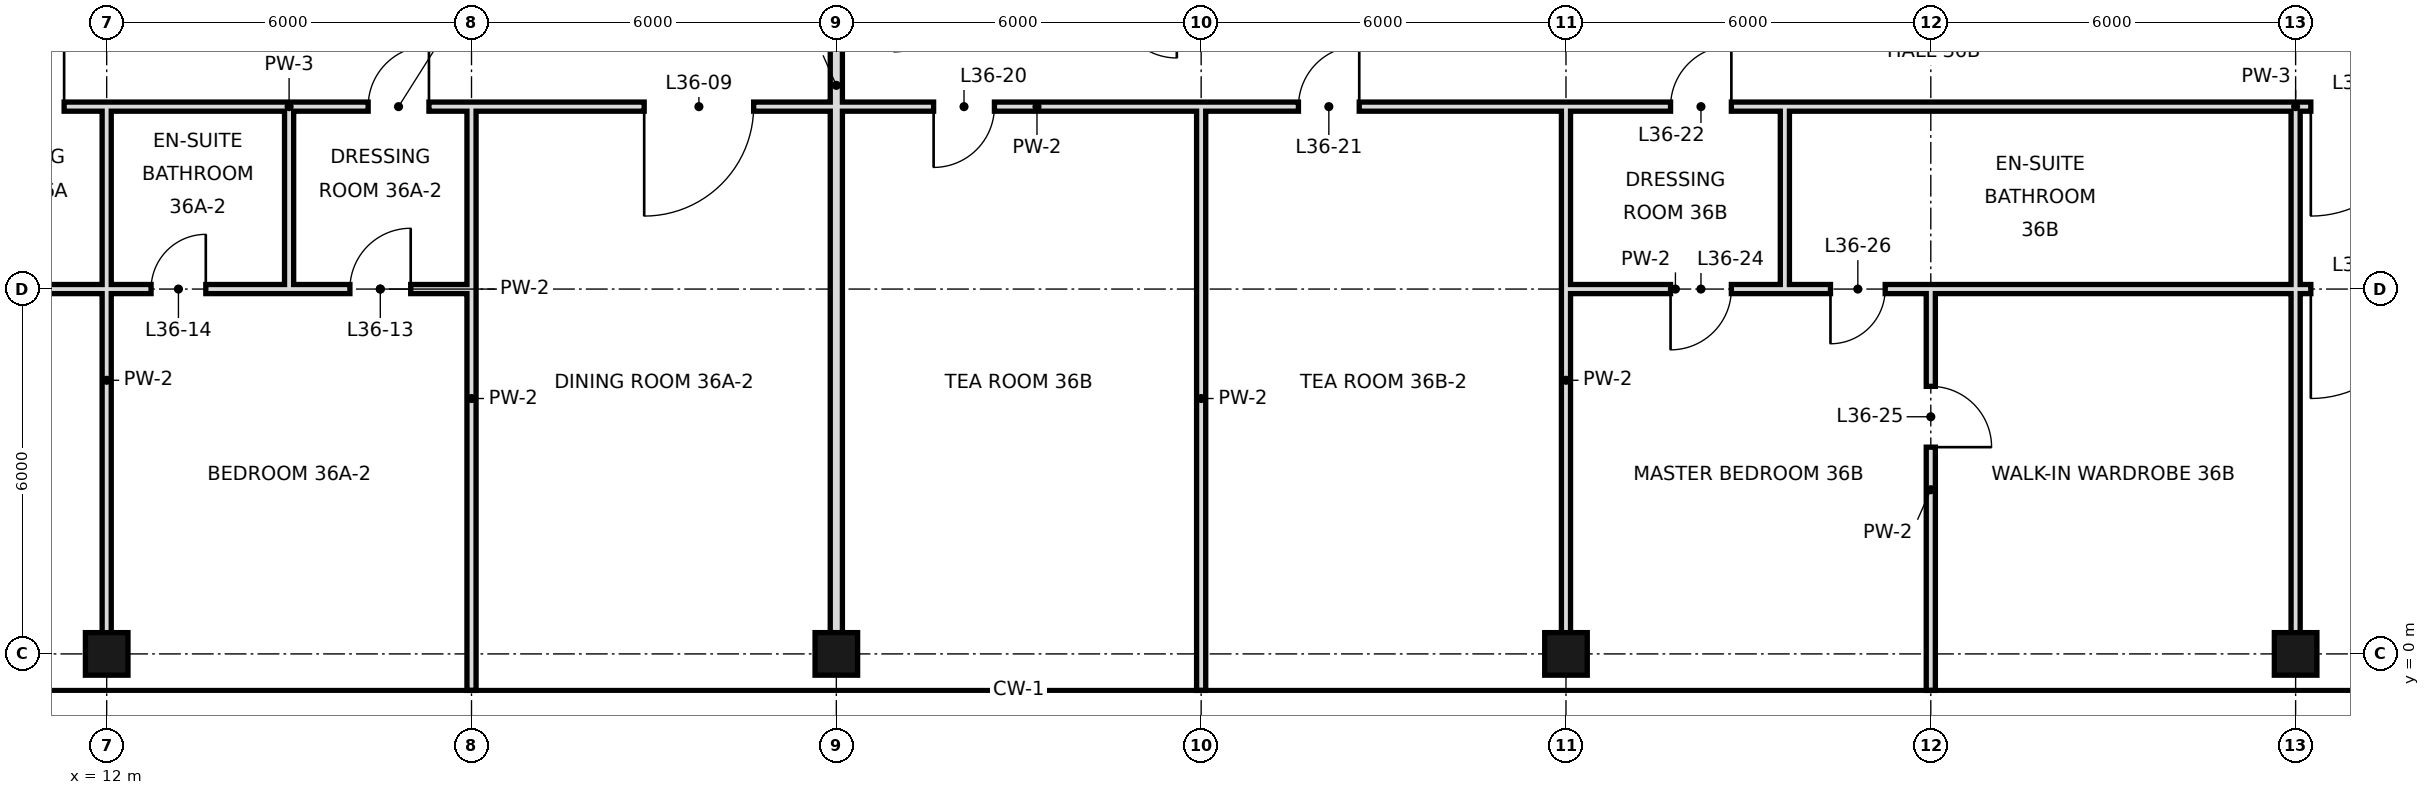
"""IFC4 building model, lengths in metres.
Left out: names, types, materials, properties, quantities, classifications, styles, units other than length and angle.
Written with IfcOpenShell. Run it as: python <this file> out.ifc"""

import sys

from ifc_helpers import new_model, si_unit, direction, frame, frame_2d, origin, origin_2d, place, context, subcontext, project, spatial, rectangle, hollow_rectangle, extrude, element, fill, save


model = new_model("IFC4")
c1 = context("Model", 3, precision=1e-05, world=origin(), true_north=direction((0.0, 1.0)))
c2 = subcontext(c1, "Body", "Model", "MODEL_VIEW")
j1 = project(units=[si_unit("LENGTHUNIT", "METRE"), si_unit("PLANEANGLEUNIT", "RADIAN")], contexts=[c1])
p1 = place(None, origin())
s1 = spatial("IfcSite", under=j1, at=p1, CompositionType="ELEMENT")
p2 = place(p1, origin())
s2 = spatial("IfcBuilding", under=s1, at=p2, CompositionType="ELEMENT")
p3 = place(p2, frame((0.0, 0.0, 158.2)))
s3 = spatial("IfcBuildingStorey", under=s2, at=p3, CompositionType="ELEMENT", Elevation=158.2)
for number, where, z_axis, x_axis in (
    (1, (12.0, 0.0, 0.0), (0.0, 0.0, 1.0), (1.0, 0.0, 0.0)),
    (2, (24.0, 0.0, 0.0), (0.0, 0.0, 1.0), (1.0, 0.0, 0.0)),
    (3, (36.0, 0.0, 0.0), (0.0, 0.0, 1.0), (1.0, 0.0, 0.0)),
    (4, (48.0, 0.0, 0.0), (0.0, 0.0, 1.0), (1.0, 0.0, 0.0)),
):
    element("IfcColumn", number, at=place(p3, frame(where, z_axis=z_axis, x_axis=x_axis)), inside=s3, PredefinedType="COLUMN", context=c2, shape_type="SweptSolid", body=[
        extrude(hollow_rectangle(XDim=0.7, YDim=0.7, WallThickness=0.036, at=origin_2d()), origin(), (0.0, 0.0, 1.0), 3.6),
    ])
p4 = place(p3, frame((12.0, 0.0, 0.0), z_axis=(0.0, 0.0, 1.0), x_axis=(0.0, 1.0, 0.0)))
e5 = element("IfcWall", 5, at=p4, inside=s3, PredefinedType="PARTITIONING", context=c2, shape_type="SweptSolid", body=[
    extrude(rectangle(XDim=6.0, YDim=0.15, at=frame_2d((3.0, 0.0))), origin(), (0.0, 0.0, 1.0), 2.68),
])
p5 = place(p3, frame((12.0, 6.0, 0.0), z_axis=(0.0, 0.0, 1.0), x_axis=(0.0, 1.0, 0.0)))
e6 = element("IfcWall", 6, at=p5, inside=s3, PredefinedType="PARTITIONING", context=c2, shape_type="SweptSolid", body=[
    extrude(rectangle(XDim=3.0, YDim=0.15, at=frame_2d((1.5, 0.0))), origin(), (0.0, 0.0, 1.0), 2.68),
])
p6 = place(p3, frame((15.0, 6.0, 0.0), z_axis=(0.0, 0.0, 1.0), x_axis=(0.0, 1.0, 0.0)))
e7 = element("IfcWall", 7, at=p6, inside=s3, PredefinedType="PARTITIONING", context=c2, shape_type="SweptSolid", body=[
    extrude(rectangle(XDim=3.0, YDim=0.15, at=frame_2d((1.5, 0.0))), origin(), (0.0, 0.0, 1.0), 3.38),
])
p7 = place(p3, frame((18.0, -0.6, 0.0), z_axis=(0.0, 0.0, 1.0), x_axis=(0.0, 1.0, 0.0)))
e8 = element("IfcWall", 8, at=p7, inside=s3, PredefinedType="PARTITIONING", context=c2, shape_type="SweptSolid", body=[
    extrude(rectangle(XDim=9.6, YDim=0.15, at=frame_2d((4.8, 0.0))), origin(), (0.0, 0.0, 1.0), 2.68),
])
p8 = place(p3, frame((24.0, 0.0, 0.0), z_axis=(0.0, 0.0, 1.0), x_axis=(0.0, 1.0, 0.0)))
e9 = element("IfcWall", 9, at=p8, inside=s3, PredefinedType="SOLIDWALL", context=c2, shape_type="SweptSolid", body=[
    extrude(rectangle(XDim=18.7, YDim=0.2, at=frame_2d((9.35, 0.0))), origin(), (0.0, 0.0, 1.0), 2.68),
])
p9 = place(p3, frame((30.0, -0.6, 0.0), z_axis=(0.0, 0.0, 1.0), x_axis=(0.0, 1.0, 0.0)))
e10 = element("IfcWall", 10, at=p9, inside=s3, PredefinedType="PARTITIONING", context=c2, shape_type="SweptSolid", body=[
    extrude(rectangle(XDim=9.6, YDim=0.15, at=frame_2d((4.8, 0.0))), origin(), (0.0, 0.0, 1.0), 2.68),
])
p10 = place(p3, frame((36.0, 0.0, 0.0), z_axis=(0.0, 0.0, 1.0), x_axis=(0.0, 1.0, 0.0)))
e11 = element("IfcWall", 11, at=p10, inside=s3, PredefinedType="PARTITIONING", context=c2, shape_type="SweptSolid", body=[
    extrude(rectangle(XDim=9.0, YDim=0.15, at=frame_2d((4.5, 0.0))), origin(), (0.0, 0.0, 1.0), 2.68),
])
p11 = place(p3, frame((39.6, 6.0, 0.0), z_axis=(0.0, 0.0, 1.0), x_axis=(0.0, 1.0, 0.0)))
e12 = element("IfcWall", 12, at=p11, inside=s3, PredefinedType="PARTITIONING", context=c2, shape_type="SweptSolid", body=[
    extrude(rectangle(XDim=3.0, YDim=0.15, at=frame_2d((1.5, 0.0))), origin(), (0.0, 0.0, 1.0), 3.38),
])
p12 = place(p3, frame((42.0, -0.6, 0.0), z_axis=(0.0, 0.0, 1.0), x_axis=(0.0, 1.0, 0.0)))
e13 = element("IfcWall", 13, at=p12, inside=s3, PredefinedType="PARTITIONING", context=c2, shape_type="SweptSolid", body=[
    extrude(rectangle(XDim=6.6, YDim=0.15, at=frame_2d((3.3, 0.0))), origin(), (0.0, 0.0, 1.0), 2.68),
])
p13 = place(p12, frame((4.0, 0.0, 0.0)))
e14 = element("IfcOpeningElement", 14, at=p13, cuts=e13, PredefinedType="OPENING", context=c2, shape_type="SweptSolid", body=[
    extrude(rectangle(XDim=1.0, YDim=2.4, at=frame_2d((0.5, 1.2))), frame((0.0, 0.085, 0.0), z_axis=(0.0, -1.0, 0.0), x_axis=(1.0, 0.0, 0.0)), (0.0, 0.0, 1.0), 0.17),
])
p14 = place(p3, frame((48.0, 0.0, 0.0), z_axis=(0.0, 0.0, 1.0), x_axis=(0.0, 1.0, 0.0)))
e15 = element("IfcWall", 15, at=p14, inside=s3, PredefinedType="PARTITIONING", context=c2, shape_type="SweptSolid", body=[
    extrude(rectangle(XDim=6.0, YDim=0.15, at=frame_2d((3.0, 0.0))), origin(), (0.0, 0.0, 1.0), 2.68),
])
p15 = place(p3, frame((48.0, 6.0, 0.0), z_axis=(0.0, 0.0, 1.0), x_axis=(0.0, 1.0, 0.0)))
e16 = element("IfcWall", 16, at=p15, inside=s3, PredefinedType="PARTITIONING", context=c2, shape_type="SweptSolid", body=[
    extrude(rectangle(XDim=3.0, YDim=0.15, at=frame_2d((1.5, 0.0))), origin(), (0.0, 0.0, 1.0), 2.68),
])
p16 = place(p3, frame((9.0, 6.0, 0.0), z_axis=(0.0, 0.0, 1.0), x_axis=(1.0, 0.0, 0.0)))
e17 = element("IfcWall", 17, at=p16, inside=s3, PredefinedType="PARTITIONING", context=c2, shape_type="SweptSolid", body=[
    extrude(rectangle(XDim=3.0, YDim=0.15, at=frame_2d((1.5, 0.0))), origin(), (0.0, 0.0, 1.0), 2.93),
])
p17 = place(p16, frame((1.0, 0.0, 0.0)))
e18 = element("IfcOpeningElement", 18, at=p17, cuts=e17, PredefinedType="OPENING", context=c2, shape_type="SweptSolid", body=[
    extrude(rectangle(XDim=1.0, YDim=2.4, at=frame_2d((0.5, 1.2))), frame((0.0, 0.085, 0.0), z_axis=(0.0, -1.0, 0.0), x_axis=(1.0, 0.0, 0.0)), (0.0, 0.0, 1.0), 0.17),
])
p18 = place(p3, frame((15.0, 6.0, 0.0), z_axis=(0.0, 0.0, 1.0), x_axis=(1.0, 0.0, 0.0)))
e19 = element("IfcWall", 19, at=p18, inside=s3, PredefinedType="PARTITIONING", context=c2, shape_type="SweptSolid", body=[
    extrude(rectangle(XDim=3.0, YDim=0.15, at=frame_2d((1.5, 0.0))), origin(), (0.0, 0.0, 1.0), 2.93),
])
p19 = place(p18, frame((1.0, 0.0, 0.0)))
e20 = element("IfcOpeningElement", 20, at=p19, cuts=e19, PredefinedType="OPENING", context=c2, shape_type="SweptSolid", body=[
    extrude(rectangle(XDim=1.0, YDim=2.4, at=frame_2d((0.5, 1.2))), frame((0.0, 0.085, 0.0), z_axis=(0.0, -1.0, 0.0), x_axis=(1.0, 0.0, 0.0)), (0.0, 0.0, 1.0), 0.17),
])
p20 = place(p3, frame((36.0, 6.0, 0.0), z_axis=(0.0, 0.0, 1.0), x_axis=(1.0, 0.0, 0.0)))
e21 = element("IfcWall", 21, at=p20, inside=s3, PredefinedType="PARTITIONING", context=c2, shape_type="SweptSolid", body=[
    extrude(rectangle(XDim=3.6, YDim=0.15, at=frame_2d((1.8, 0.0))), origin(), (0.0, 0.0, 1.0), 2.93),
])
p21 = place(p20, frame((1.72, 0.0, 0.0)))
e22 = element("IfcOpeningElement", 22, at=p21, cuts=e21, PredefinedType="OPENING", context=c2, shape_type="SweptSolid", body=[
    extrude(rectangle(XDim=1.0, YDim=2.4, at=frame_2d((0.5, 1.2))), frame((0.0, 0.085, 0.0), z_axis=(0.0, -1.0, 0.0), x_axis=(1.0, 0.0, 0.0)), (0.0, 0.0, 1.0), 0.17),
])
p22 = place(p3, frame((48.0, 6.0, 0.0), z_axis=(0.0, 0.0, 1.0), x_axis=(1.0, 0.0, 0.0)))
e23 = element("IfcWall", 23, at=p22, inside=s3, PredefinedType="PARTITIONING", context=c2, shape_type="SweptSolid", body=[
    extrude(rectangle(XDim=12.0, YDim=0.15, at=frame_2d((6.0, 0.0))), origin(), (0.0, 0.0, 1.0), 2.68),
])
p23 = place(p22, frame((0.25, 0.0, 0.0)))
e24 = element("IfcOpeningElement", 24, at=p23, cuts=e23, PredefinedType="OPENING", context=c2, shape_type="SweptSolid", body=[
    extrude(rectangle(XDim=1.8, YDim=2.4, at=frame_2d((0.9, 1.2))), frame((0.0, 0.085, 0.0), z_axis=(0.0, -1.0, 0.0), x_axis=(1.0, 0.0, 0.0)), (0.0, 0.0, 1.0), 0.17),
])
p24 = place(p3, frame((12.0, 6.0, 0.0), z_axis=(0.0, 0.0, 1.0), x_axis=(1.0, 0.0, 0.0)))
e25 = element("IfcWall", 25, at=p24, inside=s3, PredefinedType="PARTITIONING", context=c2, shape_type="SweptSolid", body=[
    extrude(rectangle(XDim=3.0, YDim=0.15, at=frame_2d((1.5, 0.0))), origin(), (0.0, 0.0, 1.0), 2.93),
])
p25 = place(p24, frame((0.73, 0.0, 0.0)))
e26 = element("IfcOpeningElement", 26, at=p25, cuts=e25, PredefinedType="OPENING", context=c2, shape_type="SweptSolid", body=[
    extrude(rectangle(XDim=0.9, YDim=2.4, at=frame_2d((0.45, 1.2))), frame((0.0, 0.085, 0.0), z_axis=(0.0, -1.0, 0.0), x_axis=(1.0, 0.0, 0.0)), (0.0, 0.0, 1.0), 0.17),
])
p26 = place(p3, frame((39.6, 6.0, 0.0), z_axis=(0.0, 0.0, 1.0), x_axis=(1.0, 0.0, 0.0)))
e27 = element("IfcWall", 27, at=p26, inside=s3, PredefinedType="PARTITIONING", context=c2, shape_type="SweptSolid", body=[
    extrude(rectangle(XDim=8.4, YDim=0.15, at=frame_2d((4.2, 0.0))), origin(), (0.0, 0.0, 1.0), 2.93),
])
p27 = place(p26, frame((0.75, 0.0, 0.0)))
e28 = element("IfcOpeningElement", 28, at=p27, cuts=e27, PredefinedType="OPENING", context=c2, shape_type="SweptSolid", body=[
    extrude(rectangle(XDim=0.9, YDim=2.4, at=frame_2d((0.45, 1.2))), frame((0.0, 0.085, 0.0), z_axis=(0.0, -1.0, 0.0), x_axis=(1.0, 0.0, 0.0)), (0.0, 0.0, 1.0), 0.17),
])
p28 = place(p3, frame((9.0, 9.0, 0.0), z_axis=(0.0, 0.0, 1.0), x_axis=(1.0, 0.0, 0.0)))
e29 = element("IfcWall", 29, at=p28, inside=s3, PredefinedType="PARTITIONING", context=c2, shape_type="SweptSolid", body=[
    extrude(rectangle(XDim=3.0, YDim=0.15, at=frame_2d((1.5, 0.0))), origin(), (0.0, 0.0, 1.0), 3.38),
])
p29 = place(p28, frame((1.3, 0.0, 0.0)))
e30 = element("IfcOpeningElement", 30, at=p29, cuts=e29, PredefinedType="OPENING", context=c2, shape_type="SweptSolid", body=[
    extrude(rectangle(XDim=1.0, YDim=2.4, at=frame_2d((0.5, 1.2))), frame((0.0, 0.085, 0.0), z_axis=(0.0, -1.0, 0.0), x_axis=(1.0, 0.0, 0.0)), (0.0, 0.0, 1.0), 0.17),
])
p30 = place(p3, frame((15.0, 9.0, 0.0), z_axis=(0.0, 0.0, 1.0), x_axis=(1.0, 0.0, 0.0)))
e31 = element("IfcWall", 31, at=p30, inside=s3, PredefinedType="PARTITIONING", context=c2, shape_type="SweptSolid", body=[
    extrude(rectangle(XDim=24.6, YDim=0.15, at=frame_2d((12.3, 0.0))), origin(), (0.0, 0.0, 1.0), 3.38),
])
p31 = place(p30, frame((1.3, 0.0, 0.0)))
e32 = element("IfcOpeningElement", 32, at=p31, cuts=e31, PredefinedType="OPENING", context=c2, shape_type="SweptSolid", body=[
    extrude(rectangle(XDim=1.0, YDim=2.4, at=frame_2d((0.5, 1.2))), frame((0.0, 0.085, 0.0), z_axis=(0.0, -1.0, 0.0), x_axis=(1.0, 0.0, 0.0)), (0.0, 0.0, 1.0), 0.17),
])
p32 = place(p30, frame((5.84, 0.0, 0.0)))
e33 = element("IfcOpeningElement", 33, at=p32, cuts=e31, PredefinedType="OPENING", context=c2, shape_type="SweptSolid", body=[
    extrude(rectangle(XDim=1.8, YDim=2.4, at=frame_2d((0.9, 1.2))), frame((0.0, 0.085, 0.0), z_axis=(0.0, -1.0, 0.0), x_axis=(1.0, 0.0, 0.0)), (0.0, 0.0, 1.0), 0.17),
])
p33 = place(p30, frame((10.6, 0.0, 0.0)))
e34 = element("IfcOpeningElement", 34, at=p33, cuts=e31, PredefinedType="OPENING", context=c2, shape_type="SweptSolid", body=[
    extrude(rectangle(XDim=1.0, YDim=2.4, at=frame_2d((0.5, 1.2))), frame((0.0, 0.085, 0.0), z_axis=(0.0, -1.0, 0.0), x_axis=(1.0, 0.0, 0.0)), (0.0, 0.0, 1.0), 0.17),
])
p34 = place(p30, frame((16.6, 0.0, 0.0)))
e35 = element("IfcOpeningElement", 35, at=p34, cuts=e31, PredefinedType="OPENING", context=c2, shape_type="SweptSolid", body=[
    extrude(rectangle(XDim=1.0, YDim=2.4, at=frame_2d((0.5, 1.2))), frame((0.0, 0.085, 0.0), z_axis=(0.0, -1.0, 0.0), x_axis=(1.0, 0.0, 0.0)), (0.0, 0.0, 1.0), 0.17),
])
p35 = place(p30, frame((22.72, 0.0, 0.0)))
e36 = element("IfcOpeningElement", 36, at=p35, cuts=e31, PredefinedType="OPENING", context=c2, shape_type="SweptSolid", body=[
    extrude(rectangle(XDim=1.0, YDim=2.4, at=frame_2d((0.5, 1.2))), frame((0.0, 0.085, 0.0), z_axis=(0.0, -1.0, 0.0), x_axis=(1.0, 0.0, 0.0)), (0.0, 0.0, 1.0), 0.17),
])
p36 = place(p3, frame((48.0, 9.0, 0.0), z_axis=(0.0, 0.0, 1.0), x_axis=(1.0, 0.0, 0.0)))
e37 = element("IfcWall", 37, at=p36, inside=s3, PredefinedType="PARTITIONING", context=c2, shape_type="SweptSolid", body=[
    extrude(rectangle(XDim=12.6, YDim=0.15, at=frame_2d((6.3, 0.0))), origin(), (0.0, 0.0, 1.0), 3.38),
])
p37 = place(p36, frame((0.25, 0.0, 0.0)))
e38 = element("IfcOpeningElement", 38, at=p37, cuts=e37, PredefinedType="OPENING", context=c2, shape_type="SweptSolid", body=[
    extrude(rectangle(XDim=1.8, YDim=2.4, at=frame_2d((0.9, 1.2))), frame((0.0, 0.085, 0.0), z_axis=(0.0, -1.0, 0.0), x_axis=(1.0, 0.0, 0.0)), (0.0, 0.0, 1.0), 0.17),
])
p38 = place(p3, frame((12.0, 9.0, 0.0), z_axis=(0.0, 0.0, 1.0), x_axis=(1.0, 0.0, 0.0)))
e39 = element("IfcWall", 39, at=p38, inside=s3, PredefinedType="PARTITIONING", context=c2, shape_type="SweptSolid", body=[
    extrude(rectangle(XDim=3.0, YDim=0.15, at=frame_2d((1.5, 0.0))), origin(), (0.0, 0.0, 1.0), 3.38),
])
p39 = place(p3, frame((39.6, 9.0, 0.0), z_axis=(0.0, 0.0, 1.0), x_axis=(1.0, 0.0, 0.0)))
e40 = element("IfcWall", 40, at=p39, inside=s3, PredefinedType="PARTITIONING", context=c2, shape_type="SweptSolid", body=[
    extrude(rectangle(XDim=8.4, YDim=0.15, at=frame_2d((4.2, 0.0))), origin(), (0.0, 0.0, 1.0), 3.38),
])
p40 = place(p29, frame((1.0, 0.0, 0.0), z_axis=(0.0, 0.0, 1.0), x_axis=(-1.0, 0.0, 0.0)))
e41 = element("IfcDoor", 41, at=p40, inside=s3, OperationType="SINGLE_SWING_LEFT", PredefinedType="DOOR", context=c2, shape_type="SweptSolid", body=[
    extrude(rectangle(XDim=1.0, YDim=2.4, at=frame_2d((0.5, 1.2))), frame((0.0, 0.025, 0.0), z_axis=(0.0, -1.0, 0.0), x_axis=(1.0, 0.0, 0.0)), (0.0, 0.0, 1.0), 0.05),
])
fill(e30, e41)
p41 = place(p31, frame((1.0, 0.0, 0.0), z_axis=(0.0, 0.0, 1.0), x_axis=(-1.0, 0.0, 0.0)))
e42 = element("IfcDoor", 42, at=p41, inside=s3, OperationType="SINGLE_SWING_LEFT", PredefinedType="DOOR", context=c2, shape_type="SweptSolid", body=[
    extrude(rectangle(XDim=1.0, YDim=2.4, at=frame_2d((0.5, 1.2))), frame((0.0, 0.025, 0.0), z_axis=(0.0, -1.0, 0.0), x_axis=(1.0, 0.0, 0.0)), (0.0, 0.0, 1.0), 0.05),
])
fill(e32, e42)
p42 = place(p32, frame((1.8, 0.0, 0.0), z_axis=(0.0, 0.0, 1.0), x_axis=(-1.0, 0.0, 0.0)))
e43 = element("IfcDoor", 43, at=p42, inside=s3, OperationType="SINGLE_SWING_RIGHT", PredefinedType="DOOR", context=c2, shape_type="SweptSolid", body=[
    extrude(rectangle(XDim=1.8, YDim=2.4, at=frame_2d((0.9, 1.2))), frame((0.0, 0.025, 0.0), z_axis=(0.0, -1.0, 0.0), x_axis=(1.0, 0.0, 0.0)), (0.0, 0.0, 1.0), 0.05),
])
fill(e33, e43)
p43 = place(p19, frame((1.0, 0.0, 0.0), z_axis=(0.0, 0.0, 1.0), x_axis=(-1.0, 0.0, 0.0)))
e44 = element("IfcDoor", 44, at=p43, inside=s3, OperationType="SINGLE_SWING_LEFT", PredefinedType="DOOR", context=c2, shape_type="SweptSolid", body=[
    extrude(rectangle(XDim=1.0, YDim=2.4, at=frame_2d((0.5, 1.2))), frame((0.0, 0.025, 0.0), z_axis=(0.0, -1.0, 0.0), x_axis=(1.0, 0.0, 0.0)), (0.0, 0.0, 1.0), 0.05),
])
fill(e20, e44)
p44 = place(p25, frame((0.9, 0.0, 0.0), z_axis=(0.0, 0.0, 1.0), x_axis=(-1.0, 0.0, 0.0)))
e45 = element("IfcDoor", 45, at=p44, inside=s3, OperationType="SINGLE_SWING_LEFT", PredefinedType="DOOR", context=c2, shape_type="SweptSolid", body=[
    extrude(rectangle(XDim=0.9, YDim=2.4, at=frame_2d((0.45, 1.2))), frame((0.0, 0.025, 0.0), z_axis=(0.0, -1.0, 0.0), x_axis=(1.0, 0.0, 0.0)), (0.0, 0.0, 1.0), 0.05),
])
fill(e26, e45)
p45 = place(p33, frame((1.0, 0.0, 0.0), z_axis=(0.0, 0.0, 1.0), x_axis=(-1.0, 0.0, 0.0)))
e46 = element("IfcDoor", 46, at=p45, inside=s3, OperationType="SINGLE_SWING_RIGHT", PredefinedType="DOOR", context=c2, shape_type="SweptSolid", body=[
    extrude(rectangle(XDim=1.0, YDim=2.4, at=frame_2d((0.5, 1.2))), frame((0.0, 0.025, 0.0), z_axis=(0.0, -1.0, 0.0), x_axis=(1.0, 0.0, 0.0)), (0.0, 0.0, 1.0), 0.05),
])
fill(e34, e46)
p46 = place(p34, frame((1.0, 0.0, 0.0), z_axis=(0.0, 0.0, 1.0), x_axis=(-1.0, 0.0, 0.0)))
e47 = element("IfcDoor", 47, at=p46, inside=s3, OperationType="SINGLE_SWING_LEFT", PredefinedType="DOOR", context=c2, shape_type="SweptSolid", body=[
    extrude(rectangle(XDim=1.0, YDim=2.4, at=frame_2d((0.5, 1.2))), frame((0.0, 0.025, 0.0), z_axis=(0.0, -1.0, 0.0), x_axis=(1.0, 0.0, 0.0)), (0.0, 0.0, 1.0), 0.05),
])
fill(e35, e47)
p47 = place(p35, frame((1.0, 0.0, 0.0), z_axis=(0.0, 0.0, 1.0), x_axis=(-1.0, 0.0, 0.0)))
e48 = element("IfcDoor", 48, at=p47, inside=s3, OperationType="SINGLE_SWING_LEFT", PredefinedType="DOOR", context=c2, shape_type="SweptSolid", body=[
    extrude(rectangle(XDim=1.0, YDim=2.4, at=frame_2d((0.5, 1.2))), frame((0.0, 0.025, 0.0), z_axis=(0.0, -1.0, 0.0), x_axis=(1.0, 0.0, 0.0)), (0.0, 0.0, 1.0), 0.05),
])
fill(e36, e48)
p48 = place(p37, frame((1.8, 0.0, 0.0), z_axis=(0.0, 0.0, 1.0), x_axis=(-1.0, 0.0, 0.0)))
e49 = element("IfcDoor", 49, at=p48, inside=s3, OperationType="SINGLE_SWING_RIGHT", PredefinedType="DOOR", context=c2, shape_type="SweptSolid", body=[
    extrude(rectangle(XDim=1.8, YDim=2.4, at=frame_2d((0.9, 1.2))), frame((0.0, 0.025, 0.0), z_axis=(0.0, -1.0, 0.0), x_axis=(1.0, 0.0, 0.0)), (0.0, 0.0, 1.0), 0.05),
])
fill(e38, e49)
p49 = place(p21, frame((1.0, 0.0, 0.0), z_axis=(0.0, 0.0, 1.0), x_axis=(-1.0, 0.0, 0.0)))
e50 = element("IfcDoor", 50, at=p49, inside=s3, OperationType="SINGLE_SWING_RIGHT", PredefinedType="DOOR", context=c2, shape_type="SweptSolid", body=[
    extrude(rectangle(XDim=1.0, YDim=2.4, at=frame_2d((0.5, 1.2))), frame((0.0, 0.025, 0.0), z_axis=(0.0, -1.0, 0.0), x_axis=(1.0, 0.0, 0.0)), (0.0, 0.0, 1.0), 0.05),
])
fill(e22, e50)
p50 = place(p13, frame((1.0, 0.0, 0.0), z_axis=(0.0, 0.0, 1.0), x_axis=(-1.0, 0.0, 0.0)))
e51 = element("IfcDoor", 51, at=p50, inside=s3, OperationType="SINGLE_SWING_RIGHT", PredefinedType="DOOR", context=c2, shape_type="SweptSolid", body=[
    extrude(rectangle(XDim=1.0, YDim=2.4, at=frame_2d((0.5, 1.2))), frame((0.0, 0.025, 0.0), z_axis=(0.0, -1.0, 0.0), x_axis=(1.0, 0.0, 0.0)), (0.0, 0.0, 1.0), 0.05),
])
fill(e14, e51)
p51 = place(p27, frame((0.9, 0.0, 0.0), z_axis=(0.0, 0.0, 1.0), x_axis=(-1.0, 0.0, 0.0)))
e52 = element("IfcDoor", 52, at=p51, inside=s3, OperationType="SINGLE_SWING_RIGHT", PredefinedType="DOOR", context=c2, shape_type="SweptSolid", body=[
    extrude(rectangle(XDim=0.9, YDim=2.4, at=frame_2d((0.45, 1.2))), frame((0.0, 0.025, 0.0), z_axis=(0.0, -1.0, 0.0), x_axis=(1.0, 0.0, 0.0)), (0.0, 0.0, 1.0), 0.05),
])
fill(e28, e52)
p52 = place(p23, frame((1.8, 0.0, 0.0), z_axis=(0.0, 0.0, 1.0), x_axis=(-1.0, 0.0, 0.0)))
e53 = element("IfcDoor", 53, at=p52, inside=s3, OperationType="SINGLE_SWING_RIGHT", PredefinedType="DOOR", context=c2, shape_type="SweptSolid", body=[
    extrude(rectangle(XDim=1.8, YDim=2.4, at=frame_2d((0.9, 1.2))), frame((0.0, 0.025, 0.0), z_axis=(0.0, -1.0, 0.0), x_axis=(1.0, 0.0, 0.0)), (0.0, 0.0, 1.0), 0.05),
])
fill(e24, e53)
save(model, sys.argv[1])
